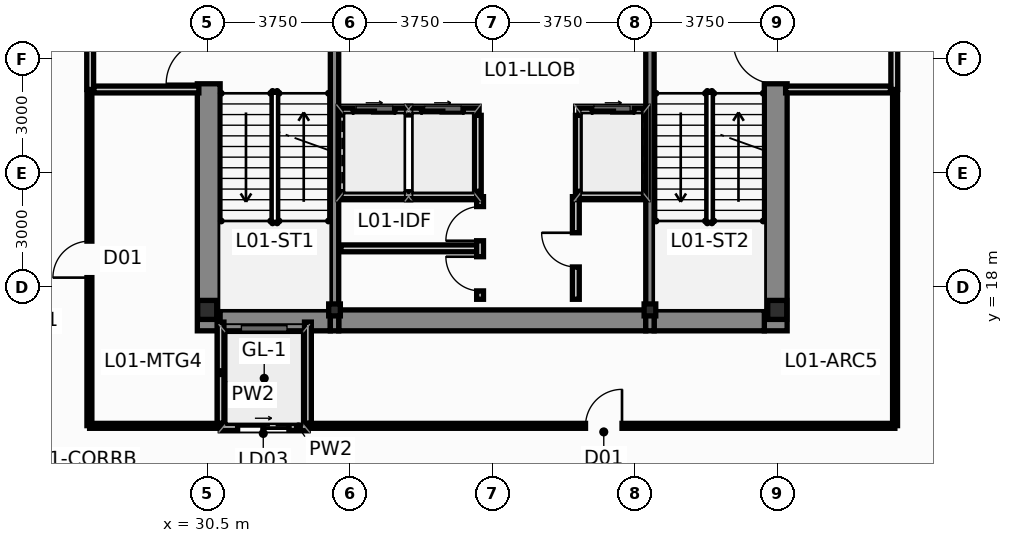
"""IFC4 building model, lengths in metres.
Left out: names, types, materials, properties, quantities, classifications, styles, units other than length and angle.
Written with IfcOpenShell. Run it as: python <this file> out.ifc"""

import sys

from ifc_helpers import new_model, si_unit, direction, frame, frame_2d, origin, origin_2d, place, context, subcontext, project, spatial, rectangle, i_section, extrude, source, transform, mapped, element, fill, save


model = new_model("IFC4")
c1 = context("Model", 3, precision=1e-05, world=origin(), true_north=direction((0.0, 1.0)))
c2 = subcontext(c1, "Body", "Model", "MODEL_VIEW")
j1 = project(units=[si_unit("LENGTHUNIT", "METRE"), si_unit("PLANEANGLEUNIT", "RADIAN")], contexts=[c1])
p1 = place(None, origin())
s1 = spatial("IfcSite", under=j1, at=p1, CompositionType="ELEMENT")
p2 = place(p1, origin())
s2 = spatial("IfcBuilding", under=s1, at=p2, CompositionType="ELEMENT")
p3 = place(p2, frame((0.0, 0.0, 5.4)))
s3 = spatial("IfcBuildingStorey", under=s2, at=p3, CompositionType="ELEMENT", Elevation=5.4)
m1 = source(origin(), c2, "Body", "SweptSolid", [
    extrude(i_section(OverallWidth=0.5, OverallDepth=0.5, WebThickness=0.028, FlangeThickness=0.04, at=origin_2d()), origin(), (0.0, 0.0, 1.0), 4.8),
])
for number, where, z_axis, x_axis in (
    (1, (30.5, 17.4, 0.0), (0.0, 0.0, 1.0), (1.0, 0.0, 0.0)),
    (2, (45.5, 17.4, 0.0), (0.0, 0.0, 1.0), (1.0, 0.0, 0.0)),
):
    element("IfcColumn", number, at=place(p3, frame(where, z_axis=z_axis, x_axis=x_axis)), inside=s3, PredefinedType="COLUMN", context=c2, shape_type="MappedRepresentation", body=[
        mapped(m1, transform((0.0, 0.0, 0.0), scale=1.0)),
    ])
m2 = source(origin(), c2, "Body", "SweptSolid", [
    extrude(i_section(OverallWidth=0.307, OverallDepth=0.315, WebThickness=0.012, FlangeThickness=0.019, at=origin_2d()), origin(), (0.0, 0.0, 1.0), 4.8),
])
for number, where, z_axis, x_axis in (
    (3, (33.85, 17.4, 0.0), (0.0, 0.0, 1.0), (1.0, 0.0, 0.0)),
    (4, (42.15, 17.4, 0.0), (0.0, 0.0, 1.0), (1.0, 0.0, 0.0)),
):
    element("IfcColumn", number, at=place(p3, frame(where, z_axis=z_axis, x_axis=x_axis)), inside=s3, PredefinedType="COLUMN", context=c2, shape_type="MappedRepresentation", body=[
        mapped(m2, transform((0.0, 0.0, 0.0), scale=1.0)),
    ])
p4 = place(p3, frame((30.54, 16.85, 0.0), z_axis=(0.0, 0.0, 1.0), x_axis=(0.0, 1.0, 0.0)))
e5 = element("IfcWall", 5, at=p4, inside=s3, PredefinedType="SHEAR", context=c2, shape_type="SweptSolid", body=[
    extrude(rectangle(XDim=13.425, YDim=0.6, at=frame_2d((6.712, 0.0))), origin(), (0.0, 0.0, 1.0), 4.8),
])
p5 = place(p4, frame((6.5, 0.0, 0.0)))
e6 = element("IfcOpeningElement", 6, at=p5, cuts=e5, PredefinedType="OPENING", context=c2, shape_type="SweptSolid", body=[
    extrude(rectangle(XDim=1.12, YDim=2.15, at=frame_2d((0.56, 1.075))), frame((0.0, 0.312, 0.0), z_axis=(0.0, -1.0, 0.0), x_axis=(1.0, 0.0, 0.0)), (0.0, 0.0, 1.0), 0.624),
])
p6 = place(p4, frame((10.95, 0.0, 0.0)))
e7 = element("IfcOpeningElement", 7, at=p6, cuts=e5, PredefinedType="OPENING", context=c2, shape_type="SweptSolid", body=[
    extrude(rectangle(XDim=1.2, YDim=2.2, at=frame_2d((0.6, 1.1))), frame((0.0, 0.312, 0.0), z_axis=(0.0, -1.0, 0.0), x_axis=(1.0, 0.0, 0.0)), (0.0, 0.0, 1.0), 0.624),
])
p7 = place(p3, frame((45.46, 16.85, 0.0), z_axis=(0.0, 0.0, 1.0), x_axis=(0.0, 1.0, 0.0)))
e8 = element("IfcWall", 8, at=p7, inside=s3, PredefinedType="SHEAR", context=c2, shape_type="SweptSolid", body=[
    extrude(rectangle(XDim=13.425, YDim=0.6, at=frame_2d((6.712, 0.0))), origin(), (0.0, 0.0, 1.0), 4.8),
])
p8 = place(p7, frame((6.5, 0.0, 0.0)))
e9 = element("IfcOpeningElement", 9, at=p8, cuts=e8, PredefinedType="OPENING", context=c2, shape_type="SweptSolid", body=[
    extrude(rectangle(XDim=1.12, YDim=2.15, at=frame_2d((0.56, 1.075))), frame((0.0, 0.312, 0.0), z_axis=(0.0, -1.0, 0.0), x_axis=(1.0, 0.0, 0.0)), (0.0, 0.0, 1.0), 0.624),
])
p9 = place(p7, frame((10.95, 0.0, 0.0)))
e10 = element("IfcOpeningElement", 10, at=p9, cuts=e8, PredefinedType="OPENING", context=c2, shape_type="SweptSolid", body=[
    extrude(rectangle(XDim=1.2, YDim=2.2, at=frame_2d((0.6, 1.1))), frame((0.0, 0.312, 0.0), z_axis=(0.0, -1.0, 0.0), x_axis=(1.0, 0.0, 0.0)), (0.0, 0.0, 1.0), 0.624),
])
p10 = place(p3, frame((30.84, 17.125, 0.0), z_axis=(0.0, 0.0, 1.0), x_axis=(1.0, 0.0, 0.0)))
e11 = element("IfcWall", 11, at=p10, inside=s3, PredefinedType="SHEAR", context=c2, shape_type="SweptSolid", body=[
    extrude(rectangle(XDim=2.9, YDim=0.55, at=frame_2d((1.45, 0.0))), origin(), (0.0, 0.0, 1.0), 4.8),
])
p11 = place(p3, frame((33.96, 17.125, 0.0), z_axis=(0.0, 0.0, 1.0), x_axis=(1.0, 0.0, 0.0)))
e12 = element("IfcWall", 12, at=p11, inside=s3, PredefinedType="SHEAR", context=c2, shape_type="SweptSolid", body=[
    extrude(rectangle(XDim=8.08, YDim=0.55, at=frame_2d((4.04, 0.0))), origin(), (0.0, 0.0, 1.0), 4.8),
])
p12 = place(p3, frame((42.26, 17.125, 0.0), z_axis=(0.0, 0.0, 1.0), x_axis=(1.0, 0.0, 0.0)))
e13 = element("IfcWall", 13, at=p12, inside=s3, PredefinedType="SHEAR", context=c2, shape_type="SweptSolid", body=[
    extrude(rectangle(XDim=2.9, YDim=0.55, at=frame_2d((1.45, 0.0))), origin(), (0.0, 0.0, 1.0), 4.8),
])
for number, where, z_axis, x_axis in (
    (14, (33.85, 16.85, 0.0), (0.0, 0.0, 1.0), (0.0, 1.0, 0.0)),
    (15, (42.15, 16.85, 0.0), (0.0, 0.0, 1.0), (0.0, 1.0, 0.0)),
):
    element("IfcWall", number, at=place(p3, frame(where, z_axis=z_axis, x_axis=x_axis)), inside=s3, PredefinedType="SHEAR", context=c2, shape_type="SweptSolid", body=[
        extrude(rectangle(XDim=13.425, YDim=0.22, at=frame_2d((6.712, 0.0))), origin(), (0.0, 0.0, 1.0), 4.8),
    ])
p13 = place(p3, frame((30.85, 14.32, 0.0), z_axis=(0.0, 0.0, 1.0), x_axis=(1.0, 0.0, 0.0)))
e16 = element("IfcWall", 16, at=p13, inside=s3, PredefinedType="PARTITIONING", context=c2, shape_type="SweptSolid", body=[
    extrude(rectangle(XDim=2.3, YDim=0.18, at=frame_2d((1.15, 0.0))), origin(), (0.0, 0.0, 1.0), 4.48),
])
p14 = place(p13, frame((0.45, 0.0, 0.0)))
e17 = element("IfcOpeningElement", 17, at=p14, cuts=e16, PredefinedType="OPENING", context=c2, shape_type="SweptSolid", body=[
    extrude(rectangle(XDim=1.35, YDim=2.25, at=frame_2d((0.675, 1.125))), frame((0.0, 0.102, 0.0), z_axis=(0.0, -1.0, 0.0), x_axis=(1.0, 0.0, 0.0)), (0.0, 0.0, 1.0), 0.204),
])
p15 = place(p3, frame((30.85, 14.42, 0.0), z_axis=(0.0, 0.0, 1.0), x_axis=(0.0, 1.0, 0.0)))
e18 = element("IfcWall", 18, at=p15, inside=s3, PredefinedType="PARTITIONING", context=c2, shape_type="SweptSolid", body=[
    extrude(rectangle(XDim=2.66, YDim=0.18, at=frame_2d((1.33, 0.0))), origin(), (0.0, 0.0, 1.0), 3.854),
])
p16 = place(p3, frame((33.15, 14.42, 0.0), z_axis=(0.0, 0.0, 1.0), x_axis=(0.0, 1.0, 0.0)))
e19 = element("IfcWall", 19, at=p16, inside=s3, PredefinedType="PARTITIONING", context=c2, shape_type="SweptSolid", body=[
    extrude(rectangle(XDim=2.66, YDim=0.18, at=frame_2d((1.33, 0.0))), origin(), (0.0, 0.0, 1.0), 4.48),
])
p17 = place(p3, frame((34.02, 22.62, 0.0), z_axis=(0.0, 0.0, 1.0), x_axis=(1.0, 0.0, 0.0)))
e20 = element("IfcWall", 20, at=p17, inside=s3, PredefinedType="PARTITIONING", context=c2, shape_type="SweptSolid", body=[
    extrude(rectangle(XDim=3.6, YDim=0.18, at=frame_2d((1.8, 0.0))), origin(), (0.0, 0.0, 1.0), 4.48),
])
p18 = place(p17, frame((0.32, 0.0, 0.0)))
e21 = element("IfcOpeningElement", 21, at=p18, cuts=e20, PredefinedType="OPENING", context=c2, shape_type="SweptSolid", body=[
    extrude(rectangle(XDim=1.1, YDim=2.2, at=frame_2d((0.55, 1.1))), frame((0.0, 0.102, 0.0), z_axis=(0.0, -1.0, 0.0), x_axis=(1.0, 0.0, 0.0)), (0.0, 0.0, 1.0), 0.204),
])
p19 = place(p17, frame((2.12, 0.0, 0.0)))
e22 = element("IfcOpeningElement", 22, at=p19, cuts=e20, PredefinedType="OPENING", context=c2, shape_type="SweptSolid", body=[
    extrude(rectangle(XDim=1.1, YDim=2.2, at=frame_2d((0.55, 1.1))), frame((0.0, 0.102, 0.0), z_axis=(0.0, -1.0, 0.0), x_axis=(1.0, 0.0, 0.0)), (0.0, 0.0, 1.0), 0.204),
])
p20 = place(p3, frame((40.28, 22.62, 0.0), z_axis=(0.0, 0.0, 1.0), x_axis=(1.0, 0.0, 0.0)))
e23 = element("IfcWall", 23, at=p20, inside=s3, PredefinedType="PARTITIONING", context=c2, shape_type="SweptSolid", body=[
    extrude(rectangle(XDim=1.7, YDim=0.18, at=frame_2d((0.85, 0.0))), origin(), (0.0, 0.0, 1.0), 4.48),
])
p21 = place(p20, frame((0.35, 0.0, 0.0)))
e24 = element("IfcOpeningElement", 24, at=p21, cuts=e23, PredefinedType="OPENING", context=c2, shape_type="SweptSolid", body=[
    extrude(rectangle(XDim=1.1, YDim=2.2, at=frame_2d((0.55, 1.1))), frame((0.0, 0.102, 0.0), z_axis=(0.0, -1.0, 0.0), x_axis=(1.0, 0.0, 0.0)), (0.0, 0.0, 1.0), 0.204),
])
for number, where, z_axis, x_axis in (
    (25, (37.62, 20.52, 0.0), (0.0, 0.0, 1.0), (0.0, 1.0, 0.0)),
    (26, (40.28, 20.52, 0.0), (0.0, 0.0, 1.0), (0.0, 1.0, 0.0)),
):
    element("IfcWall", number, at=place(p3, frame(where, z_axis=z_axis, x_axis=x_axis)), inside=s3, PredefinedType="PARTITIONING", context=c2, shape_type="SweptSolid", body=[
        extrude(rectangle(XDim=2.0, YDim=0.18, at=frame_2d((1.0, 0.0))), origin(), (0.0, 0.0, 1.0), 4.48),
    ])
p22 = place(p3, frame((27.42, 23.2, 0.0), z_axis=(0.0, 0.0, 1.0), x_axis=(0.0, 1.0, 0.0)))
e27 = element("IfcWall", 27, at=p22, inside=s3, PredefinedType="PARTITIONING", context=c2, shape_type="SweptSolid", body=[
    extrude(rectangle(XDim=6.4, YDim=0.18, at=frame_2d((3.2, 0.0))), origin(), (0.0, 0.0, 1.0), 4.106),
])
p23 = place(p22, frame((2.65, 0.0, 0.0)))
e28 = element("IfcOpeningElement", 28, at=p23, cuts=e27, PredefinedType="OPENING", context=c2, shape_type="SweptSolid", body=[
    extrude(rectangle(XDim=1.05, YDim=2.15, at=frame_2d((0.525, 1.075))), frame((0.0, 0.102, 0.0), z_axis=(0.0, -1.0, 0.0), x_axis=(1.0, 0.0, 0.0)), (0.0, 0.0, 1.0), 0.204),
])
p24 = place(p3, frame((27.52, 23.2, 0.0), z_axis=(0.0, 0.0, 1.0), x_axis=(1.0, 0.0, 0.0)))
e29 = element("IfcWall", 29, at=p24, inside=s3, PredefinedType="PARTITIONING", context=c2, shape_type="SweptSolid", body=[
    extrude(rectangle(XDim=2.76, YDim=0.18, at=frame_2d((1.38, 0.0))), origin(), (0.0, 0.0, 1.0), 4.48),
])
p25 = place(p3, frame((48.58, 23.2, 0.0), z_axis=(0.0, 0.0, 1.0), x_axis=(0.0, 1.0, 0.0)))
e30 = element("IfcWall", 30, at=p25, inside=s3, PredefinedType="PARTITIONING", context=c2, shape_type="SweptSolid", body=[
    extrude(rectangle(XDim=6.4, YDim=0.18, at=frame_2d((3.2, 0.0))), origin(), (0.0, 0.0, 1.0), 4.48),
])
p26 = place(p25, frame((2.65, 0.0, 0.0)))
e31 = element("IfcOpeningElement", 31, at=p26, cuts=e30, PredefinedType="OPENING", context=c2, shape_type="SweptSolid", body=[
    extrude(rectangle(XDim=1.05, YDim=2.15, at=frame_2d((0.525, 1.075))), frame((0.0, 0.102, 0.0), z_axis=(0.0, -1.0, 0.0), x_axis=(1.0, 0.0, 0.0)), (0.0, 0.0, 1.0), 0.204),
])
p27 = place(p3, frame((45.72, 23.2, 0.0), z_axis=(0.0, 0.0, 1.0), x_axis=(1.0, 0.0, 0.0)))
e32 = element("IfcWall", 32, at=p27, inside=s3, PredefinedType="PARTITIONING", context=c2, shape_type="SweptSolid", body=[
    extrude(rectangle(XDim=2.76, YDim=0.18, at=frame_2d((1.38, 0.0))), origin(), (0.0, 0.0, 1.0), 4.48),
])
p28 = place(p3, frame((34.02, 20.42, 0.0), z_axis=(0.0, 0.0, 1.0), x_axis=(1.0, 0.0, 0.0)))
e33 = element("IfcWall", 33, at=p28, inside=s3, PredefinedType="PARTITIONING", context=c2, shape_type="SweptSolid", body=[
    extrude(rectangle(XDim=3.64, YDim=0.18, at=frame_2d((1.82, 0.0))), origin(), (0.0, 0.0, 1.0), 4.48),
])
p29 = place(p3, frame((40.22, 20.42, 0.0), z_axis=(0.0, 0.0, 1.0), x_axis=(1.0, 0.0, 0.0)))
e34 = element("IfcWall", 34, at=p29, inside=s3, PredefinedType="PARTITIONING", context=c2, shape_type="SweptSolid", body=[
    extrude(rectangle(XDim=1.76, YDim=0.18, at=frame_2d((0.88, 0.0))), origin(), (0.0, 0.0, 1.0), 4.48),
])
p30 = place(p3, frame((34.02, 19.02, 0.0), z_axis=(0.0, 0.0, 1.0), x_axis=(1.0, 0.0, 0.0)))
e35 = element("IfcWall", 35, at=p30, inside=s3, PredefinedType="PARTITIONING", context=c2, shape_type="SweptSolid", body=[
    extrude(rectangle(XDim=3.58, YDim=0.18, at=frame_2d((1.79, 0.0))), origin(), (0.0, 0.0, 1.0), 4.48),
])
p31 = place(p3, frame((37.68, 17.68, 0.0), z_axis=(0.0, 0.0, 1.0), x_axis=(0.0, 1.0, 0.0)))
e36 = element("IfcWall", 36, at=p31, inside=s3, PredefinedType="PARTITIONING", context=c2, shape_type="SweptSolid", body=[
    extrude(rectangle(XDim=2.7, YDim=0.18, at=frame_2d((1.35, 0.0))), origin(), (0.0, 0.0, 1.0), 4.48),
])
p32 = place(p31, frame((0.22, 0.0, 0.0)))
e37 = element("IfcOpeningElement", 37, at=p32, cuts=e36, PredefinedType="OPENING", context=c2, shape_type="SweptSolid", body=[
    extrude(rectangle(XDim=0.9, YDim=2.1, at=frame_2d((0.45, 1.05))), frame((0.0, 0.102, 0.0), z_axis=(0.0, -1.0, 0.0), x_axis=(1.0, 0.0, 0.0)), (0.0, 0.0, 1.0), 0.204),
])
p33 = place(p31, frame((1.54, 0.0, 0.0)))
e38 = element("IfcOpeningElement", 38, at=p33, cuts=e36, PredefinedType="OPENING", context=c2, shape_type="SweptSolid", body=[
    extrude(rectangle(XDim=0.9, YDim=2.1, at=frame_2d((0.45, 1.05))), frame((0.0, 0.102, 0.0), z_axis=(0.0, -1.0, 0.0), x_axis=(1.0, 0.0, 0.0)), (0.0, 0.0, 1.0), 0.204),
])
p34 = place(p3, frame((40.2, 17.68, 0.0), z_axis=(0.0, 0.0, 1.0), x_axis=(0.0, 1.0, 0.0)))
e39 = element("IfcWall", 39, at=p34, inside=s3, PredefinedType="PARTITIONING", context=c2, shape_type="SweptSolid", body=[
    extrude(rectangle(XDim=2.7, YDim=0.18, at=frame_2d((1.35, 0.0))), origin(), (0.0, 0.0, 1.0), 4.48),
])
p35 = place(p34, frame((0.85, 0.0, 0.0)))
e40 = element("IfcOpeningElement", 40, at=p35, cuts=e39, PredefinedType="OPENING", context=c2, shape_type="SweptSolid", body=[
    extrude(rectangle(XDim=0.9, YDim=2.1, at=frame_2d((0.45, 1.05))), frame((0.0, 0.102, 0.0), z_axis=(0.0, -1.0, 0.0), x_axis=(1.0, 0.0, 0.0)), (0.0, 0.0, 1.0), 0.204),
])
p36 = place(p3, frame((33.275, 14.35, 0.0), z_axis=(0.0, 0.0, 1.0), x_axis=(1.0, 0.0, 0.0)))
e41 = element("IfcWall", 41, at=p36, inside=s3, PredefinedType="PARTITIONING", context=c2, shape_type="SweptSolid", body=[
    extrude(rectangle(XDim=15.32, YDim=0.13, at=frame_2d((7.66, 0.0))), origin(), (0.0, 0.0, 1.0), 4.48),
])
p37 = place(p36, frame((7.18, 0.0, 0.0)))
e42 = element("IfcOpeningElement", 42, at=p37, cuts=e41, PredefinedType="OPENING", context=c2, shape_type="SweptSolid", body=[
    extrude(rectangle(XDim=0.96, YDim=2.15, at=frame_2d((0.48, 1.075))), frame((0.0, 0.077, 0.0), z_axis=(0.0, -1.0, 0.0), x_axis=(1.0, 0.0, 0.0)), (0.0, 0.0, 1.0), 0.154),
])
p38 = place(p3, frame((27.4, 14.355, 0.0), z_axis=(0.0, 0.0, 1.0), x_axis=(0.0, 1.0, 0.0)))
e43 = element("IfcWall", 43, at=p38, inside=s3, PredefinedType="PARTITIONING", context=c2, shape_type="SweptSolid", body=[
    extrude(rectangle(XDim=8.75, YDim=0.13, at=frame_2d((4.375, 0.0))), origin(), (0.0, 0.0, 1.0), 4.106),
])
p39 = place(p38, frame((3.895, 0.0, 0.0)))
e44 = element("IfcOpeningElement", 44, at=p39, cuts=e43, PredefinedType="OPENING", context=c2, shape_type="SweptSolid", body=[
    extrude(rectangle(XDim=0.96, YDim=2.15, at=frame_2d((0.48, 1.075))), frame((0.0, 0.077, 0.0), z_axis=(0.0, -1.0, 0.0), x_axis=(1.0, 0.0, 0.0)), (0.0, 0.0, 1.0), 0.154),
])
p40 = place(p3, frame((48.6, 14.355, 0.0), z_axis=(0.0, 0.0, 1.0), x_axis=(0.0, 1.0, 0.0)))
e45 = element("IfcWall", 45, at=p40, inside=s3, PredefinedType="PARTITIONING", context=c2, shape_type="SweptSolid", body=[
    extrude(rectangle(XDim=8.75, YDim=0.13, at=frame_2d((4.375, 0.0))), origin(), (0.0, 0.0, 1.0), 4.48),
])
p41 = place(p3, frame((30.725, 14.35, 0.0), z_axis=(0.0, 0.0, 1.0), x_axis=(-1.0, 0.0, 0.0)))
e46 = element("IfcWall", 46, at=p41, inside=s3, PredefinedType="PARTITIONING", context=c2, shape_type="SweptSolid", body=[
    extrude(rectangle(XDim=3.32, YDim=0.13, at=frame_2d((1.66, 0.0))), origin(), (0.0, 0.0, 1.0), 4.48),
])
p42 = place(p5, origin())
e47 = element("IfcDoor", 47, at=p42, inside=s3, OperationType="SINGLE_SWING_LEFT", PredefinedType="DOOR", context=c2, shape_type="SweptSolid", body=[
    extrude(rectangle(XDim=1.12, YDim=2.15, at=frame_2d((0.56, 1.075))), frame((0.0, 0.025, 0.0), z_axis=(0.0, -1.0, 0.0), x_axis=(1.0, 0.0, 0.0)), (0.0, 0.0, 1.0), 0.05),
])
fill(e6, e47)
p43 = place(p8, origin())
e48 = element("IfcDoor", 48, at=p43, inside=s3, OperationType="SINGLE_SWING_RIGHT", PredefinedType="DOOR", context=c2, shape_type="SweptSolid", body=[
    extrude(rectangle(XDim=1.12, YDim=2.15, at=frame_2d((0.56, 1.075))), frame((0.0, 0.025, 0.0), z_axis=(0.0, -1.0, 0.0), x_axis=(1.0, 0.0, 0.0)), (0.0, 0.0, 1.0), 0.05),
])
fill(e9, e48)
p44 = place(p14, origin())
e49 = element("IfcDoor", 49, at=p44, inside=s3, OperationType="SLIDING_TO_LEFT", PredefinedType="DOOR", context=c2, shape_type="SweptSolid", body=[
    extrude(rectangle(XDim=1.35, YDim=2.25, at=frame_2d((0.675, 1.125))), frame((0.0, 0.025, 0.0), z_axis=(0.0, -1.0, 0.0), x_axis=(1.0, 0.0, 0.0)), (0.0, 0.0, 1.0), 0.05),
])
fill(e17, e49)
p45 = place(p18, origin())
e50 = element("IfcDoor", 50, at=p45, inside=s3, OperationType="SLIDING_TO_LEFT", PredefinedType="DOOR", context=c2, shape_type="SweptSolid", body=[
    extrude(rectangle(XDim=1.1, YDim=2.2, at=frame_2d((0.55, 1.1))), frame((0.0, 0.025, 0.0), z_axis=(0.0, -1.0, 0.0), x_axis=(1.0, 0.0, 0.0)), (0.0, 0.0, 1.0), 0.05),
])
fill(e21, e50)
p46 = place(p19, origin())
e51 = element("IfcDoor", 51, at=p46, inside=s3, OperationType="SLIDING_TO_RIGHT", PredefinedType="DOOR", context=c2, shape_type="SweptSolid", body=[
    extrude(rectangle(XDim=1.1, YDim=2.2, at=frame_2d((0.55, 1.1))), frame((0.0, 0.025, 0.0), z_axis=(0.0, -1.0, 0.0), x_axis=(1.0, 0.0, 0.0)), (0.0, 0.0, 1.0), 0.05),
])
fill(e22, e51)
p47 = place(p21, origin())
e52 = element("IfcDoor", 52, at=p47, inside=s3, OperationType="SLIDING_TO_LEFT", PredefinedType="DOOR", context=c2, shape_type="SweptSolid", body=[
    extrude(rectangle(XDim=1.1, YDim=2.2, at=frame_2d((0.55, 1.1))), frame((0.0, 0.025, 0.0), z_axis=(0.0, -1.0, 0.0), x_axis=(1.0, 0.0, 0.0)), (0.0, 0.0, 1.0), 0.05),
])
fill(e24, e52)
p48 = place(p32, origin())
e53 = element("IfcDoor", 53, at=p48, inside=s3, OperationType="SINGLE_SWING_RIGHT", PredefinedType="DOOR", context=c2, shape_type="SweptSolid", body=[
    extrude(rectangle(XDim=0.9, YDim=2.1, at=frame_2d((0.45, 1.05))), frame((0.0, 0.025, 0.0), z_axis=(0.0, -1.0, 0.0), x_axis=(1.0, 0.0, 0.0)), (0.0, 0.0, 1.0), 0.05),
])
fill(e37, e53)
p49 = place(p33, origin())
e54 = element("IfcDoor", 54, at=p49, inside=s3, OperationType="SINGLE_SWING_LEFT", PredefinedType="DOOR", context=c2, shape_type="SweptSolid", body=[
    extrude(rectangle(XDim=0.9, YDim=2.1, at=frame_2d((0.45, 1.05))), frame((0.0, 0.025, 0.0), z_axis=(0.0, -1.0, 0.0), x_axis=(1.0, 0.0, 0.0)), (0.0, 0.0, 1.0), 0.05),
])
fill(e38, e54)
p50 = place(p35, origin())
e55 = element("IfcDoor", 55, at=p50, inside=s3, OperationType="SINGLE_SWING_RIGHT", PredefinedType="DOOR", context=c2, shape_type="SweptSolid", body=[
    extrude(rectangle(XDim=0.9, YDim=2.1, at=frame_2d((0.45, 1.05))), frame((0.0, 0.025, 0.0), z_axis=(0.0, -1.0, 0.0), x_axis=(1.0, 0.0, 0.0)), (0.0, 0.0, 1.0), 0.05),
])
fill(e40, e55)
p51 = place(p37, origin())
e56 = element("IfcDoor", 56, at=p51, inside=s3, OperationType="SINGLE_SWING_RIGHT", PredefinedType="DOOR", context=c2, shape_type="SweptSolid", body=[
    extrude(rectangle(XDim=0.96, YDim=2.15, at=frame_2d((0.48, 1.075))), frame((0.0, 0.025, 0.0), z_axis=(0.0, -1.0, 0.0), x_axis=(1.0, 0.0, 0.0)), (0.0, 0.0, 1.0), 0.05),
])
fill(e42, e56)
p52 = place(p39, origin())
e57 = element("IfcDoor", 57, at=p52, inside=s3, OperationType="SINGLE_SWING_LEFT", PredefinedType="DOOR", context=c2, shape_type="SweptSolid", body=[
    extrude(rectangle(XDim=0.96, YDim=2.15, at=frame_2d((0.48, 1.075))), frame((0.0, 0.025, 0.0), z_axis=(0.0, -1.0, 0.0), x_axis=(1.0, 0.0, 0.0)), (0.0, 0.0, 1.0), 0.05),
])
fill(e44, e57)
save(model, sys.argv[1])
